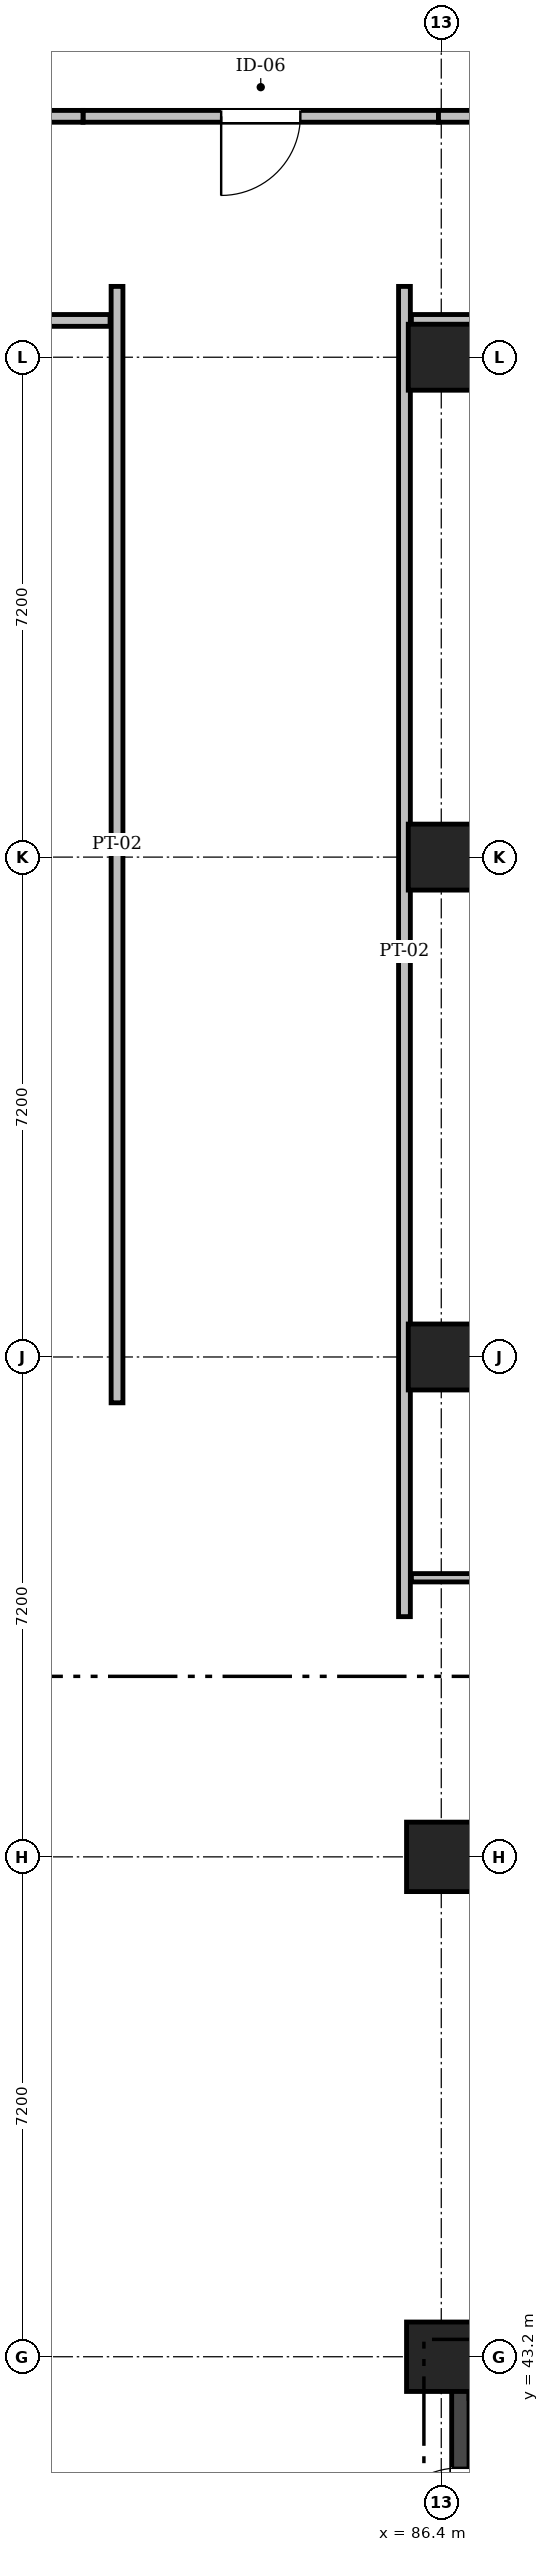
"""IFC4 building model, lengths in metres.
Left out: names, types, materials, properties, quantities, classifications, styles, units other than length and angle.
Written with IfcOpenShell. Run it as: python <this file> out.ifc"""

import sys

from ifc_helpers import new_model, si_unit, direction, frame, frame_2d, origin, origin_2d, place, context, subcontext, project, spatial, rectangle, extrude, element, fill, save


model = new_model("IFC4")
c1 = context("Model", 3, precision=1e-05, world=origin(), true_north=direction((0.0, 1.0)))
c2 = subcontext(c1, "Body", "Model", "MODEL_VIEW")
j1 = project(units=[si_unit("LENGTHUNIT", "METRE"), si_unit("PLANEANGLEUNIT", "RADIAN")], contexts=[c1])
p1 = place(None, origin())
s1 = spatial("IfcSite", under=j1, at=p1, CompositionType="ELEMENT")
p2 = place(p1, origin())
s2 = spatial("IfcBuilding", under=s1, at=p2, CompositionType="ELEMENT")
p3 = place(p2, origin())
s3 = spatial("IfcBuildingStorey", under=s2, at=p3, CompositionType="ELEMENT", Elevation=0.0)
for number, where, z_axis, x_axis in (
    (1, (86.4, 43.2, 0.0), (0.0, 0.0, 1.0), (1.0, 0.0, 0.0)),
    (2, (86.4, 50.4, 0.0), (0.0, 0.0, 1.0), (1.0, 0.0, 0.0)),
):
    element("IfcColumn", number, at=place(p3, frame(where, z_axis=z_axis, x_axis=x_axis)), inside=s3, PredefinedType="COLUMN", context=c2, shape_type="SweptSolid", body=[
        extrude(rectangle(XDim=1.0, YDim=1.0, at=origin_2d()), origin(), (0.0, 0.0, 1.0), 4.8),
    ])
for number, where, z_axis, x_axis in (
    (3, (86.4, 57.6, 0.0), (0.0, 0.0, 1.0), (1.0, 0.0, 0.0)),
    (4, (86.4, 64.8, 0.0), (0.0, 0.0, 1.0), (1.0, 0.0, 0.0)),
    (5, (86.4, 72.0, 0.0), (0.0, 0.0, 1.0), (1.0, 0.0, 0.0)),
):
    element("IfcColumn", number, at=place(p3, frame(where, z_axis=z_axis, x_axis=x_axis)), inside=s3, PredefinedType="COLUMN", context=c2, shape_type="SweptSolid", body=[
        extrude(rectangle(XDim=0.95, YDim=0.95, at=origin_2d()), origin(), (0.0, 0.0, 1.0), 4.8),
    ])
p4 = place(p3, frame((86.675, 39.15, 0.0), z_axis=(0.0, 0.0, 1.0), x_axis=(0.0, 1.0, 0.0)))
e6 = element("IfcWall", 6, at=p4, inside=s3, PredefinedType="SHEAR", context=c2, shape_type="SweptSolid", body=[
    extrude(rectangle(XDim=3.7, YDim=0.25, at=frame_2d((1.85, 0.0))), origin(), (0.0, 0.0, 1.0), 4.55),
])
p5 = place(p4, frame((1.25, 0.0, 0.0)))
e7 = element("IfcOpeningElement", 7, at=p5, cuts=e6, PredefinedType="OPENING", context=c2, shape_type="SweptSolid", body=[
    extrude(rectangle(XDim=1.2, YDim=2.15, at=frame_2d((0.6, 1.075))), frame((0.0, 0.137, 0.0), z_axis=(0.0, -1.0, 0.0), x_axis=(1.0, 0.0, 0.0)), (0.0, 0.0, 1.0), 0.274),
])
p6 = place(p3, frame((86.8, 42.725, 0.0), z_axis=(0.0, 0.0, 1.0), x_axis=(1.0, 0.0, 0.0)))
e8 = element("IfcWall", 8, at=p6, inside=s3, PredefinedType="SHEAR", context=c2, shape_type="SweptSolid", body=[
    extrude(rectangle(XDim=7.6, YDim=0.25, at=frame_2d((3.8, 0.0))), origin(), (0.0, 0.0, 1.0), 4.55),
])
p7 = place(p3, frame((85.87, 53.86, 0.0), z_axis=(0.0, 0.0, 1.0), x_axis=(0.0, 1.0, 0.0)))
e9 = element("IfcWall", 9, at=p7, inside=s3, PredefinedType="PARTITIONING", context=c2, shape_type="SweptSolid", body=[
    extrude(rectangle(XDim=19.16, YDim=0.17, at=frame_2d((9.58, 0.0))), origin(), (0.0, 0.0, 1.0), 4.46),
])
p8 = place(p3, frame((81.24, 75.47, 0.0), z_axis=(0.0, 0.0, 1.0), x_axis=(1.0, 0.0, 0.0)))
e10 = element("IfcWall", 10, at=p8, inside=s3, PredefinedType="PARTITIONING", context=c2, shape_type="SweptSolid", body=[
    extrude(rectangle(XDim=5.12, YDim=0.17, at=frame_2d((2.56, 0.0))), origin(), (0.0, 0.0, 1.0), 4.46),
])
p9 = place(p8, frame((1.99, 0.0, 0.0)))
e11 = element("IfcOpeningElement", 11, at=p9, cuts=e10, PredefinedType="OPENING", context=c2, shape_type="SweptSolid", body=[
    extrude(rectangle(XDim=1.14, YDim=2.2, at=frame_2d((0.57, 1.1))), frame((0.0, 0.097, 0.0), z_axis=(0.0, -1.0, 0.0), x_axis=(1.0, 0.0, 0.0)), (0.0, 0.0, 1.0), 0.194),
])
p10 = place(p3, frame((81.73, 56.94, 0.0), z_axis=(0.0, 0.0, 1.0), x_axis=(0.0, 1.0, 0.0)))
e12 = element("IfcWall", 12, at=p10, inside=s3, PredefinedType="PARTITIONING", context=c2, shape_type="SweptSolid", body=[
    extrude(rectangle(XDim=16.08, YDim=0.17, at=frame_2d((8.04, 0.0))), origin(), (0.0, 0.0, 1.0), 4.46),
])
p11 = place(p3, frame((79.66, 75.47, 0.0), z_axis=(0.0, 0.0, 1.0), x_axis=(1.0, 0.0, 0.0)))
e13 = element("IfcWall", 13, at=p11, inside=s3, PredefinedType="PARTITIONING", context=c2, shape_type="SweptSolid", body=[
    extrude(rectangle(XDim=1.58, YDim=0.17, at=frame_2d((0.79, 0.0))), origin(), (0.0, 0.0, 1.0), 4.46),
])
p12 = place(p3, frame((66.685, 72.53, 0.0), z_axis=(0.0, 0.0, 1.0), x_axis=(1.0, 0.0, 0.0)))
e14 = element("IfcWall", 14, at=p12, inside=s3, PredefinedType="PARTITIONING", context=c2, shape_type="SweptSolid", body=[
    extrude(rectangle(XDim=14.945, YDim=0.17, at=frame_2d((7.472, 0.0))), origin(), (0.0, 0.0, 1.0), 4.46),
])
p13 = place(p12, frame((7.363, 0.0, 0.0)))
e15 = element("IfcOpeningElement", 15, at=p13, cuts=e14, PredefinedType="OPENING", context=c2, shape_type="SweptSolid", body=[
    extrude(rectangle(XDim=1.42, YDim=2.24, at=frame_2d((0.71, 1.12))), frame((0.0, 0.097, 0.0), z_axis=(0.0, -1.0, 0.0), x_axis=(1.0, 0.0, 0.0)), (0.0, 0.0, 1.0), 0.194),
])
p14 = place(p3, frame((85.97, 72.53, 0.0), z_axis=(0.0, 0.0, 1.0), x_axis=(1.0, 0.0, 0.0)))
e16 = element("IfcWall", 16, at=p14, inside=s3, PredefinedType="PARTITIONING", context=c2, shape_type="SweptSolid", body=[
    extrude(rectangle(XDim=15.05, YDim=0.17, at=frame_2d((7.525, 0.0))), origin(), (0.0, 0.0, 1.0), 4.46),
])
p15 = place(p14, frame((4.255, 0.0, 0.0)))
e17 = element("IfcOpeningElement", 17, at=p15, cuts=e16, PredefinedType="OPENING", context=c2, shape_type="SweptSolid", body=[
    extrude(rectangle(XDim=1.34, YDim=2.24, at=frame_2d((0.67, 1.12))), frame((0.0, 0.097, 0.0), z_axis=(0.0, -1.0, 0.0), x_axis=(1.0, 0.0, 0.0)), (0.0, 0.0, 1.0), 0.194),
])
p16 = place(p3, frame((86.36, 75.47, 0.0), z_axis=(0.0, 0.0, 1.0), x_axis=(1.0, 0.0, 0.0)))
e18 = element("IfcWall", 18, at=p16, inside=s3, PredefinedType="PARTITIONING", context=c2, shape_type="SweptSolid", body=[
    extrude(rectangle(XDim=7.68, YDim=0.17, at=frame_2d((3.84, 0.0))), origin(), (0.0, 0.0, 1.0), 4.46),
])
p17 = place(p16, frame((3.06, 0.0, 0.0)))
e19 = element("IfcOpeningElement", 19, at=p17, cuts=e18, PredefinedType="OPENING", context=c2, shape_type="SweptSolid", body=[
    extrude(rectangle(XDim=1.56, YDim=2.26, at=frame_2d((0.78, 1.13))), frame((0.0, 0.097, 0.0), z_axis=(0.0, -1.0, 0.0), x_axis=(1.0, 0.0, 0.0)), (0.0, 0.0, 1.0), 0.194),
])
p18 = place(p16, frame((5.13, 0.0, 1.05)))
e20 = element("IfcOpeningElement", 20, at=p18, cuts=e18, PredefinedType="OPENING", context=c2, shape_type="SweptSolid", body=[
    extrude(rectangle(XDim=2.1, YDim=1.05, at=frame_2d((1.05, 0.525))), frame((0.0, 0.097, 0.0), z_axis=(0.0, -1.0, 0.0), x_axis=(1.0, 0.0, 0.0)), (0.0, 0.0, 1.0), 0.194),
])
p19 = place(p3, frame((85.97, 54.42, 0.0), z_axis=(0.0, 0.0, 1.0), x_axis=(1.0, 0.0, 0.0)))
e21 = element("IfcWall", 21, at=p19, inside=s3, PredefinedType="PARTITIONING", context=c2, shape_type="SweptSolid", body=[
    extrude(rectangle(XDim=9.18, YDim=0.12, at=frame_2d((4.59, 0.0))), origin(), (0.0, 0.0, 1.0), 4.46),
])
p20 = place(p5, origin())
e22 = element("IfcDoor", 22, at=p20, inside=s3, OperationType="SINGLE_SWING_LEFT", PredefinedType="DOOR", context=c2, shape_type="SweptSolid", body=[
    extrude(rectangle(XDim=1.2, YDim=2.15, at=frame_2d((0.6, 1.075))), frame((0.0, 0.025, 0.0), z_axis=(0.0, -1.0, 0.0), x_axis=(1.0, 0.0, 0.0)), (0.0, 0.0, 1.0), 0.05),
])
fill(e7, e22)
p21 = place(p9, frame((1.14, 0.0, 0.0), z_axis=(0.0, 0.0, 1.0), x_axis=(-1.0, 0.0, 0.0)))
e23 = element("IfcDoor", 23, at=p21, inside=s3, OperationType="SINGLE_SWING_RIGHT", PredefinedType="DOOR", context=c2, shape_type="SweptSolid", body=[
    extrude(rectangle(XDim=1.14, YDim=2.2, at=frame_2d((0.57, 1.1))), frame((0.0, 0.025, 0.0), z_axis=(0.0, -1.0, 0.0), x_axis=(1.0, 0.0, 0.0)), (0.0, 0.0, 1.0), 0.05),
])
fill(e11, e23)
save(model, sys.argv[1])
